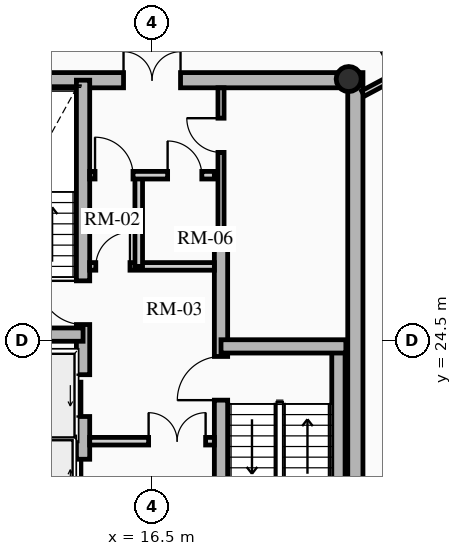
"""IFC4 building model, lengths in metres.
Left out: names, types, materials, properties, quantities, classifications, styles, units other than length and angle.
Written with IfcOpenShell. Run it as: python <this file> out.ifc"""

import sys

from ifc_helpers import new_model, si_unit, direction, frame, frame_2d, origin, origin_2d, place, context, subcontext, project, spatial, rectangle, hollow_circle, extrude, source, transform, mapped, element, fill, save


model = new_model("IFC4")
c1 = context("Model", 3, precision=1e-05, world=origin(), true_north=direction((0.0, 1.0)))
c2 = subcontext(c1, "Body", "Model", "MODEL_VIEW")
j1 = project(units=[si_unit("LENGTHUNIT", "METRE"), si_unit("PLANEANGLEUNIT", "RADIAN")], contexts=[c1])
p1 = place(None, origin())
s1 = spatial("IfcSite", under=j1, at=p1, CompositionType="ELEMENT")
p2 = place(p1, origin())
s2 = spatial("IfcBuilding", under=s1, at=p2, CompositionType="ELEMENT")
p3 = place(p2, frame((0.0, 0.0, 232.45)))
s3 = spatial("IfcBuildingStorey", under=s2, at=p3, CompositionType="ELEMENT", Elevation=232.45)
p4 = place(p3, frame((21.85, 17.45, 0.0), z_axis=(0.0, 0.0, 1.0), x_axis=(0.0, 1.0, 0.0)))
e1 = element("IfcWall", 1, at=p4, inside=s3, PredefinedType="SHEAR", context=c2, shape_type="SweptSolid", body=[
    extrude(rectangle(XDim=14.1, YDim=0.4, at=frame_2d((7.05, 0.0))), origin(), (0.0, 0.0, 1.0), 3.2),
])
p5 = place(p3, frame((11.15, 31.35, 0.0), z_axis=(0.0, 0.0, 1.0), x_axis=(1.0, 0.0, 0.0)))
e2 = element("IfcWall", 2, at=p5, inside=s3, PredefinedType="SHEAR", context=c2, shape_type="SweptSolid", body=[
    extrude(rectangle(XDim=10.7, YDim=0.4, at=frame_2d((5.35, 0.0))), origin(), (0.0, 0.0, 1.0), 3.2),
])
m1 = source(origin(), c2, "Body", "SweptSolid", [
    extrude(rectangle(XDim=1.5, YDim=2.02, at=frame_2d((0.75, 1.01))), frame((0.0, 0.21, 0.0), z_axis=(0.0, -1.0, 0.0), x_axis=(1.0, 0.0, 0.0)), (0.0, 0.0, 1.0), 0.42),
])
p6 = place(p5, frame((4.6, 0.0, 0.0)))
e3 = element("IfcOpeningElement", 3, at=p6, cuts=e2, PredefinedType="OPENING", context=c2, shape_type="MappedRepresentation", body=[
    mapped(m1, transform((0.0, 0.0, 0.0), x_axis=(1.0, 0.0, 0.0), y_axis=(0.0, 1.0, 0.0), z_axis=(0.0, 0.0, 1.0), scale=1.0)),
])
p7 = place(p3, frame((14.685, 17.65, 0.0), z_axis=(0.0, 0.0, 1.0), x_axis=(0.0, 1.0, 0.0)))
e4 = element("IfcWall", 4, at=p7, inside=s3, PredefinedType="SHEAR", context=c2, shape_type="SweptSolid", body=[
    extrude(rectangle(XDim=13.7, YDim=0.35, at=frame_2d((6.85, 0.0))), origin(), (0.0, 0.0, 1.0), 3.2),
])
m2 = source(origin(), c2, "Body", "SweptSolid", [
    extrude(rectangle(XDim=1.1, YDim=2.015, at=frame_2d((0.55, 1.007))), frame((0.0, 0.185, 0.0), z_axis=(0.0, -1.0, 0.0), x_axis=(1.0, 0.0, 0.0)), (0.0, 0.0, 1.0), 0.37),
])
p8 = place(p7, frame((4.85, 0.0, 0.0)))
e5 = element("IfcOpeningElement", 5, at=p8, cuts=e4, PredefinedType="OPENING", context=c2, shape_type="MappedRepresentation", body=[
    mapped(m2, transform((0.0, 0.0, 0.0), x_axis=(1.0, 0.0, 0.0), y_axis=(0.0, 1.0, 0.0), z_axis=(0.0, 0.0, 1.0), scale=1.0)),
])
p9 = place(p7, frame((0.625, 0.0, 0.0)))
e6 = element("IfcOpeningElement", 6, at=p9, cuts=e4, PredefinedType="OPENING", context=c2, shape_type="MappedRepresentation", body=[
    mapped(m2, transform((0.0, 0.0, 0.0), x_axis=(1.0, 0.0, 0.0), y_axis=(0.0, 1.0, 0.0), z_axis=(0.0, 0.0, 1.0), scale=1.0)),
])
p10 = place(p7, frame((2.625, 0.0, 0.0)))
e7 = element("IfcOpeningElement", 7, at=p10, cuts=e4, PredefinedType="OPENING", context=c2, shape_type="MappedRepresentation", body=[
    mapped(m2, transform((0.0, 0.0, 0.0), x_axis=(1.0, 0.0, 0.0), y_axis=(0.0, 1.0, 0.0), z_axis=(0.0, 0.0, 1.0), scale=1.0)),
])
m3 = source(origin(), c2, "Body", "SweptSolid", [
    extrude(rectangle(XDim=1.15, YDim=2.02, at=frame_2d((0.575, 1.01))), frame((0.0, 0.185, 0.0), z_axis=(0.0, -1.0, 0.0), x_axis=(1.0, 0.0, 0.0)), (0.0, 0.0, 1.0), 0.37),
])
p11 = place(p7, frame((7.27, 0.0, 0.0)))
e8 = element("IfcOpeningElement", 8, at=p11, cuts=e4, PredefinedType="OPENING", context=c2, shape_type="MappedRepresentation", body=[
    mapped(m3, transform((0.0, 0.0, 0.0), x_axis=(1.0, 0.0, 0.0), y_axis=(0.0, 1.0, 0.0), z_axis=(0.0, 0.0, 1.0), scale=1.0)),
])
p12 = place(p3, frame((18.315, 17.65, 0.0), z_axis=(0.0, 0.0, 1.0), x_axis=(0.0, 1.0, 0.0)))
e9 = element("IfcWall", 9, at=p12, inside=s3, PredefinedType="SHEAR", context=c2, shape_type="SweptSolid", body=[
    extrude(rectangle(XDim=9.6, YDim=0.35, at=frame_2d((4.8, 0.0))), origin(), (0.0, 0.0, 1.0), 3.2),
])
p13 = place(p12, frame((5.28, 0.0, 0.0)))
e10 = element("IfcOpeningElement", 10, at=p13, cuts=e9, PredefinedType="OPENING", context=c2, shape_type="MappedRepresentation", body=[
    mapped(m3, transform((0.0, 0.0, 0.0), x_axis=(1.0, 0.0, 0.0), y_axis=(0.0, 1.0, 0.0), z_axis=(0.0, 0.0, 1.0), scale=1.0)),
])
p14 = place(p3, frame((11.4, 24.655, 0.0), z_axis=(0.0, 0.0, 1.0), x_axis=(1.0, 0.0, 0.0)))
e11 = element("IfcWall", 11, at=p14, inside=s3, PredefinedType="SHEAR", context=c2, shape_type="SweptSolid", body=[
    extrude(rectangle(XDim=3.285, YDim=0.35, at=frame_2d((1.643, 0.0))), origin(), (0.0, 0.0, 1.0), 3.2),
])
p15 = place(p3, frame((21.405, 17.65, 0.0), z_axis=(0.0, 0.0, 1.0), x_axis=(0.0, 1.0, 0.0)))
e12 = element("IfcWall", 12, at=p15, inside=s3, PredefinedType="SHEAR", context=c2, shape_type="SweptSolid", body=[
    extrude(rectangle(XDim=6.695, YDim=0.35, at=frame_2d((3.348, 0.0))), origin(), (0.0, 0.0, 1.0), 3.2),
])
p16 = place(p3, frame((18.315, 24.345, 0.0), z_axis=(0.0, 0.0, 1.0), x_axis=(1.0, 0.0, 0.0)))
e13 = element("IfcWall", 13, at=p16, inside=s3, PredefinedType="SHEAR", context=c2, shape_type="SweptSolid", body=[
    extrude(rectangle(XDim=3.285, YDim=0.35, at=frame_2d((1.643, 0.0))), origin(), (0.0, 0.0, 1.0), 3.2),
])
p17 = place(p3, frame((21.675, 31.38, 0.0), z_axis=(0.0, 0.0, 1.0), x_axis=(1.0, 0.0, 0.0)))
e14 = element("IfcColumn", 14, at=p17, inside=s3, PredefinedType="COLUMN", context=c2, shape_type="SweptSolid", body=[
    extrude(hollow_circle(Radius=0.33, WallThickness=0.025, at=origin_2d()), origin(), (0.0, 0.0, 1.0), 3.2),
])
p18 = place(p3, frame((11.52, 21.8, 0.0), z_axis=(0.0, 0.0, 1.0), x_axis=(1.0, 0.0, 0.0)))
e15 = element("IfcWall", 15, at=p18, inside=s3, PredefinedType="SHEAR", context=c2, shape_type="SweptSolid", body=[
    extrude(rectangle(XDim=2.97, YDim=0.2, at=frame_2d((1.485, 0.0))), origin(), (0.0, 0.0, 1.0), 3.2),
])
p19 = place(p3, frame((14.86, 21.85, 0.0), z_axis=(0.0, 0.0, 1.0), x_axis=(1.0, 0.0, 0.0)))
e16 = element("IfcWall", 16, at=p19, inside=s3, PredefinedType="PARTITIONING", context=c2, shape_type="SweptSolid", body=[
    extrude(rectangle(XDim=3.28, YDim=0.2, at=frame_2d((1.64, 0.0))), origin(), (0.0, 0.0, 1.0), 2.765),
])
m4 = source(origin(), c2, "Body", "SweptSolid", [
    extrude(rectangle(XDim=1.5, YDim=2.02, at=frame_2d((0.75, 1.01))), frame((0.0, 0.11, 0.0), z_axis=(0.0, -1.0, 0.0), x_axis=(1.0, 0.0, 0.0)), (0.0, 0.0, 1.0), 0.22),
])
p20 = place(p19, frame((1.55, 0.0, 0.0)))
e17 = element("IfcOpeningElement", 17, at=p20, cuts=e16, PredefinedType="OPENING", context=c2, shape_type="MappedRepresentation", body=[
    mapped(m4, transform((0.0, 0.0, 0.0), x_axis=(1.0, 0.0, 0.0), y_axis=(0.0, 1.0, 0.0), z_axis=(0.0, 0.0, 1.0), scale=1.0)),
])
p21 = place(p3, frame((14.86, 26.45, 0.0), z_axis=(0.0, 0.0, 1.0), x_axis=(1.0, 0.0, 0.0)))
e18 = element("IfcWall", 18, at=p21, inside=s3, PredefinedType="PARTITIONING", context=c2, shape_type="SweptSolid", body=[
    extrude(rectangle(XDim=3.28, YDim=0.2, at=frame_2d((1.64, 0.0))), origin(), (0.0, 0.0, 1.0), 2.765),
])
m5 = source(origin(), c2, "Body", "SweptSolid", [
    extrude(rectangle(XDim=0.9, YDim=2.005, at=frame_2d((0.45, 1.002))), frame((0.0, 0.11, 0.0), z_axis=(0.0, -1.0, 0.0), x_axis=(1.0, 0.0, 0.0)), (0.0, 0.0, 1.0), 0.22),
])
p22 = place(p21, frame((0.16, 0.0, 0.0)))
e19 = element("IfcOpeningElement", 19, at=p22, cuts=e18, PredefinedType="OPENING", context=c2, shape_type="MappedRepresentation", body=[
    mapped(m5, transform((0.0, 0.0, 0.0), x_axis=(1.0, 0.0, 0.0), y_axis=(0.0, 1.0, 0.0), z_axis=(0.0, 0.0, 1.0), scale=1.0)),
])
p23 = place(p3, frame((16.15, 26.45, 0.0), z_axis=(0.0, 0.0, 1.0), x_axis=(0.0, 1.0, 0.0)))
e20 = element("IfcWall", 20, at=p23, inside=s3, PredefinedType="PARTITIONING", context=c2, shape_type="SweptSolid", body=[
    extrude(rectangle(XDim=2.4, YDim=0.2, at=frame_2d((1.2, 0.0))), origin(), (0.0, 0.0, 1.0), 2.765),
])
p24 = place(p3, frame((14.86, 28.85, 0.0), z_axis=(0.0, 0.0, 1.0), x_axis=(1.0, 0.0, 0.0)))
e21 = element("IfcWall", 21, at=p24, inside=s3, PredefinedType="PARTITIONING", context=c2, shape_type="SweptSolid", body=[
    extrude(rectangle(XDim=3.28, YDim=0.2, at=frame_2d((1.64, 0.0))), origin(), (0.0, 0.0, 1.0), 2.765),
])
m6 = source(origin(), c2, "Body", "SweptSolid", [
    extrude(rectangle(XDim=1.0, YDim=2.015, at=frame_2d((0.5, 1.007))), frame((0.0, 0.11, 0.0), z_axis=(0.0, -1.0, 0.0), x_axis=(1.0, 0.0, 0.0)), (0.0, 0.0, 1.0), 0.22),
])
p25 = place(p24, frame((0.14, 0.0, 0.0)))
e22 = element("IfcOpeningElement", 22, at=p25, cuts=e21, PredefinedType="OPENING", context=c2, shape_type="MappedRepresentation", body=[
    mapped(m6, transform((0.0, 0.0, 0.0), x_axis=(1.0, 0.0, 0.0), y_axis=(0.0, 1.0, 0.0), z_axis=(0.0, 0.0, 1.0), scale=1.0)),
])
p26 = place(p24, frame((2.05, 0.0, 0.0)))
e23 = element("IfcOpeningElement", 23, at=p26, cuts=e21, PredefinedType="OPENING", context=c2, shape_type="MappedRepresentation", body=[
    mapped(m5, transform((0.0, 0.0, 0.0), x_axis=(1.0, 0.0, 0.0), y_axis=(0.0, 1.0, 0.0), z_axis=(0.0, 0.0, 1.0), scale=1.0)),
])
p27 = place(p3, frame((18.315, 27.25, 0.0), z_axis=(0.0, 0.0, 1.0), x_axis=(0.0, 1.0, 0.0)))
e24 = element("IfcWall", 24, at=p27, inside=s3, PredefinedType="PARTITIONING", context=c2, shape_type="SweptSolid", body=[
    extrude(rectangle(XDim=3.9, YDim=0.16, at=frame_2d((1.95, 0.0))), origin(), (0.0, 0.0, 1.0), 2.765),
])
m7 = source(origin(), c2, "Body", "SweptSolid", [
    extrude(rectangle(XDim=0.9, YDim=2.005, at=frame_2d((0.45, 1.002))), frame((0.0, 0.09, 0.0), z_axis=(0.0, -1.0, 0.0), x_axis=(1.0, 0.0, 0.0)), (0.0, 0.0, 1.0), 0.18),
])
p28 = place(p27, frame((2.2, 0.0, 0.0)))
e25 = element("IfcOpeningElement", 25, at=p28, cuts=e24, PredefinedType="OPENING", context=c2, shape_type="MappedRepresentation", body=[
    mapped(m7, transform((0.0, 0.0, 0.0), x_axis=(1.0, 0.0, 0.0), y_axis=(0.0, 1.0, 0.0), z_axis=(0.0, 0.0, 1.0), scale=1.0)),
])
p29 = place(p3, frame((22.05, 31.0, 0.0), z_axis=(0.0, 0.0, 1.0), x_axis=(0.882791584709, 0.469764853908, 0.0)))
e26 = element("IfcWall", 26, at=p29, inside=s3, PredefinedType="PARTITIONING", context=c2, shape_type="SweptSolid", body=[
    extrude(rectangle(XDim=2.186, YDim=0.16, at=frame_2d((1.093, 0.0))), origin(), (0.0, 0.0, 1.0), 2.335),
])
m8 = source(origin(), c2, "Body", "SweptSolid", [
    extrude(rectangle(XDim=1.05, YDim=2.015, at=frame_2d((0.525, 1.007))), frame((0.0, 0.09, 0.0), z_axis=(0.0, -1.0, 0.0), x_axis=(1.0, 0.0, 0.0)), (0.0, 0.0, 1.0), 0.18),
])
p30 = place(p29, frame((0.936, 0.0, 0.0)))
e27 = element("IfcOpeningElement", 27, at=p30, cuts=e26, PredefinedType="OPENING", context=c2, shape_type="MappedRepresentation", body=[
    mapped(m8, transform((0.0, 0.0, 0.0), x_axis=(1.0, 0.0, 0.0), y_axis=(0.0, 1.0, 0.0), z_axis=(0.0, 0.0, 1.0), scale=1.0)),
])
m9 = source(origin(), c2, "Body", "SweptSolid", [
    extrude(rectangle(XDim=1.1, YDim=2.015, at=frame_2d((0.55, 1.007))), frame((0.0, 0.025, 0.0), z_axis=(0.0, -1.0, 0.0), x_axis=(1.0, 0.0, 0.0)), (0.0, 0.0, 1.0), 0.05),
])
p31 = place(p8, origin())
e28 = element("IfcDoor", 28, at=p31, inside=s3, OperationType="SLIDING_TO_LEFT", PredefinedType="DOOR", context=c2, shape_type="MappedRepresentation", body=[
    mapped(m9, transform((0.0, 0.0, 0.0), x_axis=(1.0, 0.0, 0.0), y_axis=(0.0, 1.0, 0.0), z_axis=(0.0, 0.0, 1.0), scale=1.0)),
])
fill(e5, e28)
p32 = place(p10, origin())
e29 = element("IfcDoor", 29, at=p32, inside=s3, OperationType="SLIDING_TO_RIGHT", PredefinedType="DOOR", context=c2, shape_type="MappedRepresentation", body=[
    mapped(m9, transform((0.0, 0.0, 0.0), x_axis=(1.0, 0.0, 0.0), y_axis=(0.0, 1.0, 0.0), z_axis=(0.0, 0.0, 1.0), scale=1.0)),
])
fill(e7, e29)
m10 = source(origin(), c2, "Body", "SweptSolid", [
    extrude(rectangle(XDim=1.15, YDim=2.02, at=frame_2d((0.575, 1.01))), frame((0.0, 0.025, 0.0), z_axis=(0.0, -1.0, 0.0), x_axis=(1.0, 0.0, 0.0)), (0.0, 0.0, 1.0), 0.05),
])
p33 = place(p11, origin())
e30 = element("IfcDoor", 30, at=p33, inside=s3, OperationType="SINGLE_SWING_RIGHT", PredefinedType="DOOR", context=c2, shape_type="MappedRepresentation", body=[
    mapped(m10, transform((0.0, 0.0, 0.0), x_axis=(1.0, 0.0, 0.0), y_axis=(0.0, 1.0, 0.0), z_axis=(0.0, 0.0, 1.0), scale=1.0)),
])
fill(e8, e30)
p34 = place(p13, origin())
e31 = element("IfcDoor", 31, at=p34, inside=s3, OperationType="SINGLE_SWING_LEFT", PredefinedType="DOOR", context=c2, shape_type="MappedRepresentation", body=[
    mapped(m10, transform((0.0, 0.0, 0.0), x_axis=(1.0, 0.0, 0.0), y_axis=(0.0, 1.0, 0.0), z_axis=(0.0, 0.0, 1.0), scale=1.0)),
])
fill(e10, e31)
m11 = source(origin(), c2, "Body", "SweptSolid", [
    extrude(rectangle(XDim=1.5, YDim=2.02, at=frame_2d((0.75, 1.01))), frame((0.0, 0.025, 0.0), z_axis=(0.0, -1.0, 0.0), x_axis=(1.0, 0.0, 0.0)), (0.0, 0.0, 1.0), 0.05),
])
p35 = place(p6, origin())
e32 = element("IfcDoor", 32, at=p35, inside=s3, OperationType="DOUBLE_DOOR_SINGLE_SWING", PredefinedType="DOOR", context=c2, shape_type="MappedRepresentation", body=[
    mapped(m11, transform((0.0, 0.0, 0.0), x_axis=(1.0, 0.0, 0.0), y_axis=(0.0, 1.0, 0.0), z_axis=(0.0, 0.0, 1.0), scale=1.0)),
])
fill(e3, e32)
p36 = place(p20, origin())
e33 = element("IfcDoor", 33, at=p36, inside=s3, OperationType="DOUBLE_DOOR_SINGLE_SWING", PredefinedType="DOOR", context=c2, shape_type="MappedRepresentation", body=[
    mapped(m11, transform((0.0, 0.0, 0.0), x_axis=(1.0, 0.0, 0.0), y_axis=(0.0, 1.0, 0.0), z_axis=(0.0, 0.0, 1.0), scale=1.0)),
])
fill(e17, e33)
m12 = source(origin(), c2, "Body", "SweptSolid", [
    extrude(rectangle(XDim=0.9, YDim=2.005, at=frame_2d((0.45, 1.002))), frame((0.0, 0.025, 0.0), z_axis=(0.0, -1.0, 0.0), x_axis=(1.0, 0.0, 0.0)), (0.0, 0.0, 1.0), 0.05),
])
p37 = place(p22, origin())
e34 = element("IfcDoor", 34, at=p37, inside=s3, OperationType="SINGLE_SWING_RIGHT", PredefinedType="DOOR", context=c2, shape_type="MappedRepresentation", body=[
    mapped(m12, transform((0.0, 0.0, 0.0), x_axis=(1.0, 0.0, 0.0), y_axis=(0.0, 1.0, 0.0), z_axis=(0.0, 0.0, 1.0), scale=1.0)),
])
fill(e19, e34)
m13 = source(origin(), c2, "Body", "SweptSolid", [
    extrude(rectangle(XDim=1.0, YDim=2.015, at=frame_2d((0.5, 1.007))), frame((0.0, 0.025, 0.0), z_axis=(0.0, -1.0, 0.0), x_axis=(1.0, 0.0, 0.0)), (0.0, 0.0, 1.0), 0.05),
])
p38 = place(p25, origin())
e35 = element("IfcDoor", 35, at=p38, inside=s3, OperationType="SINGLE_SWING_LEFT", PredefinedType="DOOR", context=c2, shape_type="MappedRepresentation", body=[
    mapped(m13, transform((0.0, 0.0, 0.0), x_axis=(1.0, 0.0, 0.0), y_axis=(0.0, 1.0, 0.0), z_axis=(0.0, 0.0, 1.0), scale=1.0)),
])
fill(e22, e35)
p39 = place(p26, origin())
e36 = element("IfcDoor", 36, at=p39, inside=s3, OperationType="SINGLE_SWING_LEFT", PredefinedType="DOOR", context=c2, shape_type="MappedRepresentation", body=[
    mapped(m12, transform((0.0, 0.0, 0.0), x_axis=(1.0, 0.0, 0.0), y_axis=(0.0, 1.0, 0.0), z_axis=(0.0, 0.0, 1.0), scale=1.0)),
])
fill(e23, e36)
p40 = place(p28, origin())
e37 = element("IfcDoor", 37, at=p40, inside=s3, OperationType="SINGLE_SWING_RIGHT", PredefinedType="DOOR", context=c2, shape_type="MappedRepresentation", body=[
    mapped(m12, transform((0.0, 0.0, 0.0), x_axis=(1.0, 0.0, 0.0), y_axis=(0.0, 1.0, 0.0), z_axis=(0.0, 0.0, 1.0), scale=1.0)),
])
fill(e25, e37)
save(model, sys.argv[1])
